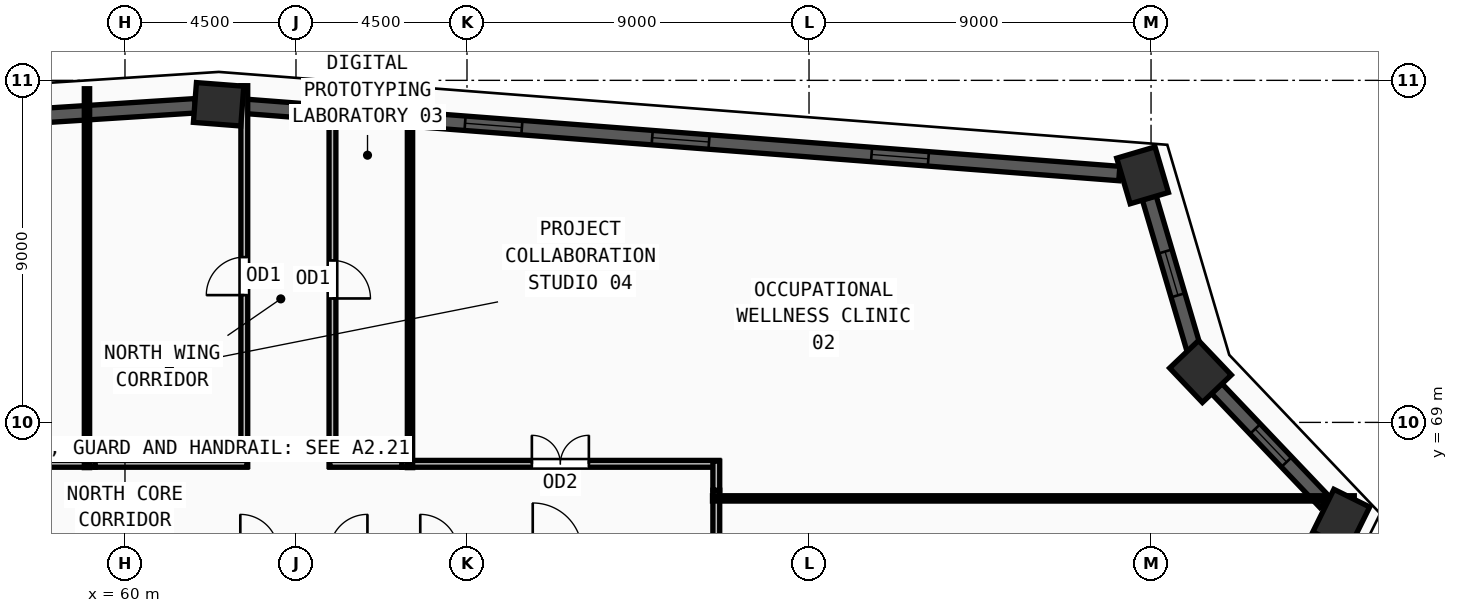
"""IFC4 building model, lengths in metres.
Left out: names, types, materials, properties, quantities, classifications, styles, units other than length and angle.
Written with IfcOpenShell. Run it as: python <this file> out.ifc"""

import sys

from ifc_helpers import new_model, si_unit, direction, frame, frame_2d, origin, origin_2d, place, context, subcontext, project, spatial, rectangle, extrude, source, transform, mapped, element, fill, save


model = new_model("IFC4")
c1 = context("Model", 3, precision=1e-05, world=origin(), true_north=direction((0.0, 1.0)))
c2 = subcontext(c1, "Body", "Model", "MODEL_VIEW")
j1 = project(units=[si_unit("LENGTHUNIT", "METRE"), si_unit("PLANEANGLEUNIT", "RADIAN")], contexts=[c1])
p1 = place(None, origin())
s1 = spatial("IfcSite", under=j1, at=p1, CompositionType="ELEMENT")
p2 = place(p1, origin())
s2 = spatial("IfcBuilding", under=s1, at=p2, CompositionType="ELEMENT")
p3 = place(p2, frame((0.0, 0.0, 247.5)))
s3 = spatial("IfcBuildingStorey", under=s2, at=p3, CompositionType="ELEMENT", Elevation=247.5)
m1 = source(origin(), c2, "Body", "SweptSolid", [
    extrude(rectangle(XDim=1.25, YDim=1.05, at=origin_2d()), origin(), (0.0, 0.0, 1.0), 3.75),
])
for number, where, z_axis, x_axis in (
    (1, (62.464, 77.37, 0.0), (0.0, 0.0, 1.0), (-0.997, 0.077, 0.0)),
    (2, (86.778, 75.501, 0.0), (0.0, 0.0, 1.0), (-0.283, 0.959, 0.0)),
    (3, (88.301, 70.339, 0.0), (0.0, 0.0, 1.0), (-0.689, 0.724, 0.0)),
    (4, (92.005, 66.446, 0.0), (0.0, 0.0, 1.0), (0.444, 0.896, 0.0)),
):
    element("IfcColumn", number, at=place(p3, frame(where, z_axis=z_axis, x_axis=x_axis)), inside=s3, PredefinedType="COLUMN", context=c2, shape_type="MappedRepresentation", body=[
        mapped(m1, transform((0.0, 0.0, 0.0), x_axis=(1.0, 0.0, 0.0), y_axis=(0.0, 1.0, 0.0), z_axis=(0.0, 0.0, 1.0), scale=1.0)),
    ])
p4 = place(p3, frame((91.581, 66.892, 0.0), z_axis=(0.0, 0.0, 1.0), x_axis=(-0.689387303183, 0.724392950139, 0.0)))
e5 = element("IfcWall", 5, at=p4, inside=s3, PredefinedType="SOLIDWALL", context=c2, shape_type="SweptSolid", body=[
    extrude(rectangle(XDim=4.143, YDim=0.38, at=frame_2d((2.071, 0.0))), origin(), (0.0, 0.0, 1.0), 3.57),
])
m2 = source(origin(), c2, "Body", "SweptSolid", [
    extrude(rectangle(XDim=1.2, YDim=1.9, at=frame_2d((0.6, 0.95))), frame((0.0, 0.2, 0.0), z_axis=(0.0, -1.0, 0.0), x_axis=(1.0, 0.0, 0.0)), (0.0, 0.0, 1.0), 0.4),
])
p5 = place(p4, frame((1.471, 0.0, 0.55)))
e6 = element("IfcOpeningElement", 6, at=p5, cuts=e5, PredefinedType="OPENING", context=c2, shape_type="MappedRepresentation", body=[
    mapped(m2, transform((0.0, 0.0, 0.0), x_axis=(1.0, 0.0, 0.0), y_axis=(0.0, 1.0, 0.0), z_axis=(0.0, 0.0, 1.0), scale=1.0)),
])
p6 = place(p3, frame((88.127, 70.929, 0.0), z_axis=(0.0, 0.0, 1.0), x_axis=(-0.283028996967, 0.959111352699, 0.0)))
e7 = element("IfcWall", 7, at=p6, inside=s3, PredefinedType="SOLIDWALL", context=c2, shape_type="SweptSolid", body=[
    extrude(rectangle(XDim=4.152, YDim=0.38, at=frame_2d((2.076, 0.0))), origin(), (0.0, 0.0, 1.0), 3.57),
])
p7 = place(p6, frame((1.476, 0.0, 0.55)))
e8 = element("IfcOpeningElement", 8, at=p7, cuts=e7, PredefinedType="OPENING", context=c2, shape_type="MappedRepresentation", body=[
    mapped(m2, transform((0.0, 0.0, 0.0), x_axis=(1.0, 0.0, 0.0), y_axis=(0.0, 1.0, 0.0), z_axis=(0.0, 0.0, 1.0), scale=1.0)),
])
p8 = place(p3, frame((86.165, 75.548, 0.0), z_axis=(0.0, 0.0, 1.0), x_axis=(-0.997058143471, 0.076648930443, 0.0)))
e9 = element("IfcWall", 9, at=p8, inside=s3, PredefinedType="SOLIDWALL", context=c2, shape_type="SweptSolid", body=[
    extrude(rectangle(XDim=23.156, YDim=0.38, at=frame_2d((11.578, 0.0))), origin(), (0.0, 0.0, 1.0), 3.57),
])
m3 = source(origin(), c2, "Body", "SweptSolid", [
    extrude(rectangle(XDim=1.5, YDim=1.9, at=frame_2d((0.75, 0.95))), frame((0.0, 0.2, 0.0), z_axis=(0.0, -1.0, 0.0), x_axis=(1.0, 0.0, 0.0)), (0.0, 0.0, 1.0), 0.4),
])
p9 = place(p8, frame((5.039, 0.0, 0.55)))
e10 = element("IfcOpeningElement", 10, at=p9, cuts=e9, PredefinedType="OPENING", context=c2, shape_type="MappedRepresentation", body=[
    mapped(m3, transform((0.0, 0.0, 0.0), x_axis=(1.0, 0.0, 0.0), y_axis=(0.0, 1.0, 0.0), z_axis=(0.0, 0.0, 1.0), scale=1.0)),
])
p10 = place(p8, frame((10.828, 0.0, 0.55)))
e11 = element("IfcOpeningElement", 11, at=p10, cuts=e9, PredefinedType="OPENING", context=c2, shape_type="MappedRepresentation", body=[
    mapped(m3, transform((0.0, 0.0, 0.0), x_axis=(1.0, 0.0, 0.0), y_axis=(0.0, 1.0, 0.0), z_axis=(0.0, 0.0, 1.0), scale=1.0)),
])
p11 = place(p8, frame((15.767, 0.0, 0.55)))
e12 = element("IfcOpeningElement", 12, at=p11, cuts=e9, PredefinedType="OPENING", context=c2, shape_type="MappedRepresentation", body=[
    mapped(m3, transform((0.0, 0.0, 0.0), x_axis=(1.0, 0.0, 0.0), y_axis=(0.0, 1.0, 0.0), z_axis=(0.0, 0.0, 1.0), scale=1.0)),
])
p12 = place(p3, frame((61.85, 77.331, 0.0), z_axis=(0.0, 0.0, 1.0), x_axis=(-0.997946898195, -0.064046767155, 0.0)))
e13 = element("IfcWall", 13, at=p12, inside=s3, PredefinedType="SOLIDWALL", context=c2, shape_type="SweptSolid", body=[
    extrude(rectangle(XDim=28.075, YDim=0.38, at=frame_2d((14.037, 0.0))), origin(), (0.0, 0.0, 1.0), 3.57),
])
p13 = place(p12, frame((6.269, 0.0, 0.55)))
e14 = element("IfcOpeningElement", 14, at=p13, cuts=e13, PredefinedType="OPENING", context=c2, shape_type="MappedRepresentation", body=[
    mapped(m3, transform((0.0, 0.0, 0.0), x_axis=(1.0, 0.0, 0.0), y_axis=(0.0, 1.0, 0.0), z_axis=(0.0, 0.0, 1.0), scale=1.0)),
])
p14 = place(p12, frame((13.287, 0.0, 0.55)))
e15 = element("IfcOpeningElement", 15, at=p14, cuts=e13, PredefinedType="OPENING", context=c2, shape_type="MappedRepresentation", body=[
    mapped(m3, transform((0.0, 0.0, 0.0), x_axis=(1.0, 0.0, 0.0), y_axis=(0.0, 1.0, 0.0), z_axis=(0.0, 0.0, 1.0), scale=1.0)),
])
p15 = place(p12, frame((20.306, 0.0, 0.55)))
e16 = element("IfcOpeningElement", 16, at=p15, cuts=e13, PredefinedType="OPENING", context=c2, shape_type="MappedRepresentation", body=[
    mapped(m3, transform((0.0, 0.0, 0.0), x_axis=(1.0, 0.0, 0.0), y_axis=(0.0, 1.0, 0.0), z_axis=(0.0, 0.0, 1.0), scale=1.0)),
])
p16 = place(p3, frame((67.285, 67.91, 0.0), z_axis=(0.0, 0.0, 1.0), x_axis=(1.0, 0.0, 0.0)))
e17 = element("IfcWall", 17, at=p16, inside=s3, PredefinedType="PARTITIONING", context=c2, shape_type="SweptSolid", body=[
    extrude(rectangle(XDim=8.345, YDim=0.18, at=frame_2d((4.172, 0.0))), origin(), (0.0, 0.0, 1.0), 3.205),
])
m4 = source(origin(), c2, "Body", "SweptSolid", [
    extrude(rectangle(XDim=1.5, YDim=2.2, at=frame_2d((0.75, 1.1))), frame((0.0, 0.1, 0.0), z_axis=(0.0, -1.0, 0.0), x_axis=(1.0, 0.0, 0.0)), (0.0, 0.0, 1.0), 0.2),
])
p17 = place(p16, frame((3.422, 0.0, 0.0)))
e18 = element("IfcOpeningElement", 18, at=p17, cuts=e17, PredefinedType="OPENING", context=c2, shape_type="MappedRepresentation", body=[
    mapped(m4, transform((0.0, 0.0, 0.0), x_axis=(1.0, 0.0, 0.0), y_axis=(0.0, 1.0, 0.0), z_axis=(0.0, 0.0, 1.0), scale=1.0)),
])
p18 = place(p3, frame((65.46, 77.681, 0.0), z_axis=(0.0, 0.0, 1.0), x_axis=(0.0, -1.0, 0.0)))
e19 = element("IfcWall", 19, at=p18, inside=s3, PredefinedType="PARTITIONING", context=c2, shape_type="SweptSolid", body=[
    extrude(rectangle(XDim=9.841, YDim=0.18, at=frame_2d((4.92, 0.0))), origin(), (0.0, 0.0, 1.0), 3.57),
])
m5 = source(origin(), c2, "Body", "SweptSolid", [
    extrude(rectangle(XDim=1.0, YDim=2.2, at=frame_2d((0.5, 1.1))), frame((0.0, 0.1, 0.0), z_axis=(0.0, -1.0, 0.0), x_axis=(1.0, 0.0, 0.0)), (0.0, 0.0, 1.0), 0.2),
])
p19 = place(p18, frame((4.42, 0.0, 0.0)))
e20 = element("IfcOpeningElement", 20, at=p19, cuts=e19, PredefinedType="OPENING", context=c2, shape_type="MappedRepresentation", body=[
    mapped(m5, transform((0.0, 0.0, 0.0), x_axis=(1.0, 0.0, 0.0), y_axis=(0.0, 1.0, 0.0), z_axis=(0.0, 0.0, 1.0), scale=1.0)),
])
p20 = place(p3, frame((63.14, 67.84, 0.0), z_axis=(0.0, 0.0, 1.0), x_axis=(0.0, 1.0, 0.0)))
e21 = element("IfcWall", 21, at=p20, inside=s3, PredefinedType="PARTITIONING", context=c2, shape_type="SweptSolid", body=[
    extrude(rectangle(XDim=10.019, YDim=0.18, at=frame_2d((5.009, 0.0))), origin(), (0.0, 0.0, 1.0), 3.57),
])
p21 = place(p20, frame((4.509, 0.0, 0.0)))
e22 = element("IfcOpeningElement", 22, at=p21, cuts=e21, PredefinedType="OPENING", context=c2, shape_type="MappedRepresentation", body=[
    mapped(m5, transform((0.0, 0.0, 0.0), x_axis=(1.0, 0.0, 0.0), y_axis=(0.0, 1.0, 0.0), z_axis=(0.0, 0.0, 1.0), scale=1.0)),
])
p22 = place(p3, frame((50.285, 67.91, 0.0), z_axis=(0.0, 0.0, 1.0), x_axis=(1.0, 0.0, 0.0)))
e23 = element("IfcWall", 23, at=p22, inside=s3, PredefinedType="PARTITIONING", context=c2, shape_type="SweptSolid", body=[
    extrude(rectangle(XDim=8.93, YDim=0.18, at=frame_2d((4.465, 0.0))), origin(), (0.0, 0.0, 1.0), 3.205),
])
p23 = place(p22, frame((3.965, 0.0, 0.0)))
e24 = element("IfcOpeningElement", 24, at=p23, cuts=e23, PredefinedType="OPENING", context=c2, shape_type="MappedRepresentation", body=[
    mapped(m5, transform((0.0, 0.0, 0.0), x_axis=(1.0, 0.0, 0.0), y_axis=(0.0, 1.0, 0.0), z_axis=(0.0, 0.0, 1.0), scale=1.0)),
])
p24 = place(p3, frame((75.56, 67.215, 0.0), z_axis=(0.0, 0.0, 1.0), x_axis=(0.0, -1.0, 0.0)))
e25 = element("IfcWall", 25, at=p24, inside=s3, PredefinedType="PARTITIONING", context=c2, shape_type="SweptSolid", body=[
    extrude(rectangle(XDim=2.235, YDim=0.18, at=frame_2d((1.118, 0.0))), origin(), (0.0, 0.0, 1.0), 3.57),
])
p25 = place(p3, frame((75.56, 67.98, 0.0), z_axis=(0.0, 0.0, 1.0), x_axis=(0.0, -1.0, 0.0)))
e26 = element("IfcWall", 26, at=p25, inside=s3, PredefinedType="PARTITIONING", context=c2, shape_type="SweptSolid", body=[
    extrude(rectangle(XDim=0.765, YDim=0.18, at=frame_2d((0.382, 0.0))), origin(), (0.0, 0.0, 1.0), 3.57),
])
p26 = place(p3, frame((65.39, 67.91, 0.0), z_axis=(0.0, 0.0, 1.0), x_axis=(1.0, 0.0, 0.0)))
e27 = element("IfcWall", 27, at=p26, inside=s3, PredefinedType="PARTITIONING", context=c2, shape_type="SweptSolid", body=[
    extrude(rectangle(XDim=1.895, YDim=0.18, at=frame_2d((0.948, 0.0))), origin(), (0.0, 0.0, 1.0), 3.57),
])
p27 = place(p3, frame((59.215, 67.91, 0.0), z_axis=(0.0, 0.0, 1.0), x_axis=(1.0, 0.0, 0.0)))
e28 = element("IfcWall", 28, at=p27, inside=s3, PredefinedType="PARTITIONING", context=c2, shape_type="SweptSolid", body=[
    extrude(rectangle(XDim=3.995, YDim=0.18, at=frame_2d((1.998, 0.0))), origin(), (0.0, 0.0, 1.0), 3.57),
])
p28 = place(p3, frame((75.46, 67.0, 0.0), z_axis=(0.0, 0.0, 1.0), x_axis=(1.0, 0.0, 0.0)))
e29 = element("IfcWall", 29, at=p28, inside=s3, PredefinedType="PARTITIONING", context=c2, shape_type="SweptSolid", body=[
    extrude(rectangle(XDim=16.888, YDim=0.14, at=frame_2d((8.444, 0.0))), origin(), (0.0, 0.0, 1.0), 3.57),
])
p29 = place(p3, frame((59.0, 67.81, 0.0), z_axis=(0.0, 0.0, 1.0), x_axis=(0.0, 1.0, 0.0)))
e30 = element("IfcWall", 30, at=p29, inside=s3, PredefinedType="PARTITIONING", context=c2, shape_type="SweptSolid", body=[
    extrude(rectangle(XDim=9.969, YDim=0.14, at=frame_2d((4.984, 0.0))), origin(), (0.0, 0.0, 1.0), 3.57),
])
p30 = place(p3, frame((67.5, 67.81, 0.0), z_axis=(0.0, 0.0, 1.0), x_axis=(0.0, 1.0, 0.0)))
e31 = element("IfcWall", 31, at=p30, inside=s3, PredefinedType="PARTITIONING", context=c2, shape_type="SweptSolid", body=[
    extrude(rectangle(XDim=9.805, YDim=0.14, at=frame_2d((4.902, 0.0))), origin(), (0.0, 0.0, 1.0), 3.57),
])
m6 = source(origin(), c2, "Body", "SweptSolid", [
    extrude(rectangle(XDim=1.2, YDim=1.9, at=frame_2d((0.6, 0.95))), frame((0.0, 0.03, 0.0), z_axis=(0.0, -1.0, 0.0), x_axis=(1.0, 0.0, 0.0)), (0.0, 0.0, 1.0), 0.06),
])
p31 = place(p5, origin())
e32 = element("IfcWindow", 32, at=p31, inside=s3, PartitioningType="SINGLE_PANEL", PredefinedType="WINDOW", context=c2, shape_type="MappedRepresentation", body=[
    mapped(m6, transform((0.0, 0.0, 0.0), x_axis=(1.0, 0.0, 0.0), y_axis=(0.0, 1.0, 0.0), z_axis=(0.0, 0.0, 1.0), scale=1.0)),
])
fill(e6, e32)
p32 = place(p7, origin())
e33 = element("IfcWindow", 33, at=p32, inside=s3, PartitioningType="SINGLE_PANEL", PredefinedType="WINDOW", context=c2, shape_type="MappedRepresentation", body=[
    mapped(m6, transform((0.0, 0.0, 0.0), x_axis=(1.0, 0.0, 0.0), y_axis=(0.0, 1.0, 0.0), z_axis=(0.0, 0.0, 1.0), scale=1.0)),
])
fill(e8, e33)
m7 = source(origin(), c2, "Body", "SweptSolid", [
    extrude(rectangle(XDim=1.5, YDim=1.9, at=frame_2d((0.75, 0.95))), frame((0.0, 0.03, 0.0), z_axis=(0.0, -1.0, 0.0), x_axis=(1.0, 0.0, 0.0)), (0.0, 0.0, 1.0), 0.06),
])
p33 = place(p9, origin())
e34 = element("IfcWindow", 34, at=p33, inside=s3, PartitioningType="DOUBLE_PANEL_VERTICAL", PredefinedType="WINDOW", context=c2, shape_type="MappedRepresentation", body=[
    mapped(m7, transform((0.0, 0.0, 0.0), x_axis=(1.0, 0.0, 0.0), y_axis=(0.0, 1.0, 0.0), z_axis=(0.0, 0.0, 1.0), scale=1.0)),
])
fill(e10, e34)
p34 = place(p10, origin())
e35 = element("IfcWindow", 35, at=p34, inside=s3, PartitioningType="DOUBLE_PANEL_VERTICAL", PredefinedType="WINDOW", context=c2, shape_type="MappedRepresentation", body=[
    mapped(m7, transform((0.0, 0.0, 0.0), x_axis=(1.0, 0.0, 0.0), y_axis=(0.0, 1.0, 0.0), z_axis=(0.0, 0.0, 1.0), scale=1.0)),
])
fill(e11, e35)
p35 = place(p11, origin())
e36 = element("IfcWindow", 36, at=p35, inside=s3, PartitioningType="DOUBLE_PANEL_VERTICAL", PredefinedType="WINDOW", context=c2, shape_type="MappedRepresentation", body=[
    mapped(m7, transform((0.0, 0.0, 0.0), x_axis=(1.0, 0.0, 0.0), y_axis=(0.0, 1.0, 0.0), z_axis=(0.0, 0.0, 1.0), scale=1.0)),
])
fill(e12, e36)
m8 = source(origin(), c2, "Body", "SweptSolid", [
    extrude(rectangle(XDim=1.5, YDim=2.2, at=frame_2d((0.75, 1.1))), frame((0.0, 0.025, 0.0), z_axis=(0.0, -1.0, 0.0), x_axis=(1.0, 0.0, 0.0)), (0.0, 0.0, 1.0), 0.05),
])
p36 = place(p17, origin())
e37 = element("IfcDoor", 37, at=p36, inside=s3, OperationType="DOUBLE_DOOR_SINGLE_SWING", PredefinedType="DOOR", context=c2, shape_type="MappedRepresentation", body=[
    mapped(m8, transform((0.0, 0.0, 0.0), x_axis=(1.0, 0.0, 0.0), y_axis=(0.0, 1.0, 0.0), z_axis=(0.0, 0.0, 1.0), scale=1.0)),
])
fill(e18, e37)
m9 = source(origin(), c2, "Body", "SweptSolid", [
    extrude(rectangle(XDim=1.0, YDim=2.2, at=frame_2d((0.5, 1.1))), frame((0.0, 0.025, 0.0), z_axis=(0.0, -1.0, 0.0), x_axis=(1.0, 0.0, 0.0)), (0.0, 0.0, 1.0), 0.05),
])
p37 = place(p19, origin())
e38 = element("IfcDoor", 38, at=p37, inside=s3, OperationType="SINGLE_SWING_RIGHT", PredefinedType="DOOR", context=c2, shape_type="MappedRepresentation", body=[
    mapped(m9, transform((0.0, 0.0, 0.0), x_axis=(1.0, 0.0, 0.0), y_axis=(0.0, 1.0, 0.0), z_axis=(0.0, 0.0, 1.0), scale=1.0)),
])
fill(e20, e38)
p38 = place(p21, origin())
e39 = element("IfcDoor", 39, at=p38, inside=s3, OperationType="SINGLE_SWING_LEFT", PredefinedType="DOOR", context=c2, shape_type="MappedRepresentation", body=[
    mapped(m9, transform((0.0, 0.0, 0.0), x_axis=(1.0, 0.0, 0.0), y_axis=(0.0, 1.0, 0.0), z_axis=(0.0, 0.0, 1.0), scale=1.0)),
])
fill(e22, e39)
save(model, sys.argv[1])
